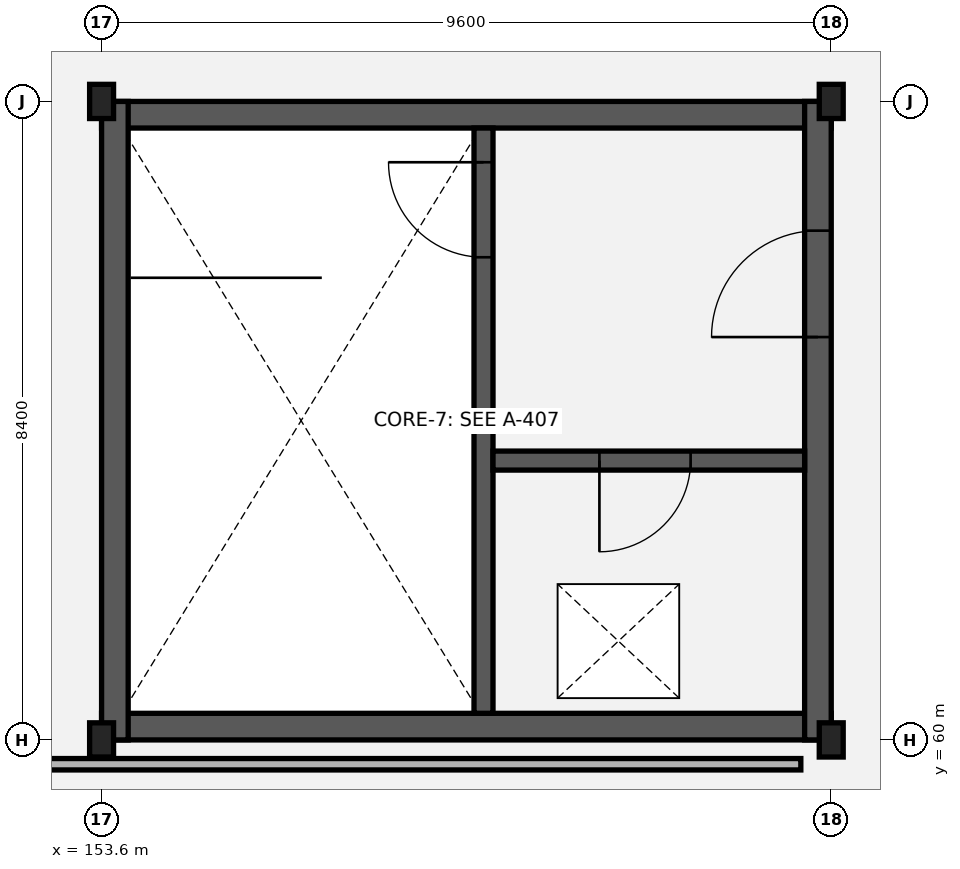
"""IFC4 building model, lengths in metres.
Left out: names, types, materials, properties, quantities, classifications, styles, units other than length and angle.
Written with IfcOpenShell. Run it as: python <this file> out.ifc"""

import sys

from ifc_helpers import new_model, si_unit, direction, frame, frame_2d, origin, origin_2d, place, context, subcontext, project, spatial, rectangle, extrude, element, fill, save


model = new_model("IFC4")
c1 = context("Model", 3, precision=1e-05, world=origin(), true_north=direction((0.0, 1.0)))
c2 = subcontext(c1, "Body", "Model", "MODEL_VIEW")
j1 = project(units=[si_unit("LENGTHUNIT", "METRE"), si_unit("PLANEANGLEUNIT", "RADIAN")], contexts=[c1])
p1 = place(None, origin())
s1 = spatial("IfcSite", under=j1, at=p1, CompositionType="ELEMENT")
p2 = place(p1, origin())
s2 = spatial("IfcBuilding", under=s1, at=p2, CompositionType="ELEMENT")
p3 = place(p2, frame((0.0, 0.0, 10.2)))
s3 = spatial("IfcBuildingStorey", under=s2, at=p3, CompositionType="ELEMENT", Elevation=10.2)
for number, where, z_axis, x_axis in (
    (1, (153.6, 60.0, 0.0), (0.0, 0.0, 1.0), (1.0, 0.0, 0.0)),
    (2, (153.6, 68.4, 0.0), (0.0, 0.0, 1.0), (1.0, 0.0, 0.0)),
):
    element("IfcColumn", number, at=place(p3, frame(where, z_axis=z_axis, x_axis=x_axis)), inside=s3, PredefinedType="COLUMN", context=c2, shape_type="SweptSolid", body=[
        extrude(rectangle(XDim=0.315, YDim=0.45, at=origin_2d()), origin(), (0.0, 0.0, 1.0), 3.98),
    ])
for number, where, z_axis, x_axis in (
    (3, (163.2, 60.0, 0.0), (0.0, 0.0, 1.0), (1.0, 0.0, 0.0)),
    (4, (163.2, 68.4, 0.0), (0.0, 0.0, 1.0), (1.0, 0.0, 0.0)),
):
    element("IfcColumn", number, at=place(p3, frame(where, z_axis=z_axis, x_axis=x_axis)), inside=s3, PredefinedType="COLUMN", context=c2, shape_type="SweptSolid", body=[
        extrude(rectangle(XDim=0.315, YDim=0.45, at=origin_2d()), origin(), (0.0, 0.0, 1.0), 5.072),
    ])
for number, where, z_axis, x_axis in (
    (5, (153.6, 68.225, 0.0), (0.0, 0.0, 1.0), (1.0, 0.0, 0.0)),
    (6, (153.6, 60.175, 0.0), (0.0, 0.0, 1.0), (1.0, 0.0, 0.0)),
):
    element("IfcWall", number, at=place(p3, frame(where, z_axis=z_axis, x_axis=x_axis)), inside=s3, PredefinedType="SHEAR", context=c2, shape_type="SweptSolid", body=[
        extrude(rectangle(XDim=9.6, YDim=0.35, at=frame_2d((4.8, 0.0))), origin(), (0.0, 0.0, 1.0), 3.95),
    ])
p4 = place(p3, frame((153.775, 60.0, 0.0), z_axis=(0.0, 0.0, 1.0), x_axis=(0.0, 1.0, 0.0)))
e7 = element("IfcWall", 7, at=p4, inside=s3, PredefinedType="SHEAR", context=c2, shape_type="SweptSolid", body=[
    extrude(rectangle(XDim=8.4, YDim=0.35, at=frame_2d((4.2, 0.0))), origin(), (0.0, 0.0, 1.0), 3.95),
])
p5 = place(p3, frame((163.025, 60.0, 0.0), z_axis=(0.0, 0.0, 1.0), x_axis=(0.0, 1.0, 0.0)))
e8 = element("IfcWall", 8, at=p5, inside=s3, PredefinedType="SHEAR", context=c2, shape_type="SweptSolid", body=[
    extrude(rectangle(XDim=8.4, YDim=0.35, at=frame_2d((4.2, 0.0))), origin(), (0.0, 0.0, 1.0), 3.95),
])
p6 = place(p5, frame((5.3, 0.0, 0.0)))
e9 = element("IfcOpeningElement", 9, at=p6, cuts=e8, PredefinedType="OPENING", context=c2, shape_type="SweptSolid", body=[
    extrude(rectangle(XDim=1.4, YDim=2.15, at=frame_2d((0.7, 1.075))), frame((0.0, 0.185, 0.0), z_axis=(0.0, -1.0, 0.0), x_axis=(1.0, 0.0, 0.0)), (0.0, 0.0, 1.0), 0.37),
])
p7 = place(p3, frame((158.625, 68.05, 0.0), z_axis=(0.0, 0.0, 1.0), x_axis=(0.0, -1.0, 0.0)))
e10 = element("IfcWall", 10, at=p7, inside=s3, PredefinedType="SHEAR", context=c2, shape_type="SweptSolid", body=[
    extrude(rectangle(XDim=7.7, YDim=0.25, at=frame_2d((3.85, 0.0))), origin(), (0.0, 0.0, 1.0), 3.95),
])
p8 = place(p7, frame((0.45, 0.0, 0.0)))
e11 = element("IfcOpeningElement", 11, at=p8, cuts=e10, PredefinedType="OPENING", context=c2, shape_type="SweptSolid", body=[
    extrude(rectangle(XDim=1.25, YDim=2.15, at=frame_2d((0.625, 1.075))), frame((0.0, 0.135, 0.0), z_axis=(0.0, -1.0, 0.0), x_axis=(1.0, 0.0, 0.0)), (0.0, 0.0, 1.0), 0.27),
])
p9 = place(p3, frame((158.75, 63.675, 0.0), z_axis=(0.0, 0.0, 1.0), x_axis=(1.0, 0.0, 0.0)))
e12 = element("IfcWall", 12, at=p9, inside=s3, PredefinedType="SHEAR", context=c2, shape_type="SweptSolid", body=[
    extrude(rectangle(XDim=4.1, YDim=0.25, at=frame_2d((2.05, 0.0))), origin(), (0.0, 0.0, 1.0), 3.95),
])
p10 = place(p9, frame((1.4, 0.0, 0.0)))
e13 = element("IfcOpeningElement", 13, at=p10, cuts=e12, PredefinedType="OPENING", context=c2, shape_type="SweptSolid", body=[
    extrude(rectangle(XDim=1.2, YDim=2.15, at=frame_2d((0.6, 1.075))), frame((0.0, 0.135, 0.0), z_axis=(0.0, -1.0, 0.0), x_axis=(1.0, 0.0, 0.0)), (0.0, 0.0, 1.0), 0.27),
])
p11 = place(p3, frame((145.0, 59.68, 0.0), z_axis=(0.0, 0.0, 1.0), x_axis=(1.0, 0.0, 0.0)))
e14 = element("IfcWall", 14, at=p11, inside=s3, PredefinedType="PARTITIONING", context=c2, shape_type="SweptSolid", body=[
    extrude(rectangle(XDim=17.8, YDim=0.15, at=frame_2d((8.9, 0.0))), origin(), (0.0, 0.0, 1.0), 3.03),
])
p12 = place(p8, origin())
e15 = element("IfcDoor", 15, at=p12, inside=s3, OperationType="SINGLE_SWING_RIGHT", PredefinedType="DOOR", context=c2, shape_type="SweptSolid", body=[
    extrude(rectangle(XDim=1.25, YDim=2.15, at=frame_2d((0.625, 1.075))), frame((0.0, 0.025, 0.0), z_axis=(0.0, -1.0, 0.0), x_axis=(1.0, 0.0, 0.0)), (0.0, 0.0, 1.0), 0.05),
])
fill(e11, e15)
p13 = place(p10, origin())
e16 = element("IfcDoor", 16, at=p13, inside=s3, OperationType="SINGLE_SWING_RIGHT", PredefinedType="DOOR", context=c2, shape_type="SweptSolid", body=[
    extrude(rectangle(XDim=1.2, YDim=2.15, at=frame_2d((0.6, 1.075))), frame((0.0, 0.025, 0.0), z_axis=(0.0, -1.0, 0.0), x_axis=(1.0, 0.0, 0.0)), (0.0, 0.0, 1.0), 0.05),
])
fill(e13, e16)
p14 = place(p6, origin())
e17 = element("IfcDoor", 17, at=p14, inside=s3, OperationType="SINGLE_SWING_LEFT", PredefinedType="DOOR", context=c2, shape_type="SweptSolid", body=[
    extrude(rectangle(XDim=1.4, YDim=2.15, at=frame_2d((0.7, 1.075))), frame((0.0, 0.025, 0.0), z_axis=(0.0, -1.0, 0.0), x_axis=(1.0, 0.0, 0.0)), (0.0, 0.0, 1.0), 0.05),
])
fill(e9, e17)
save(model, sys.argv[1])
